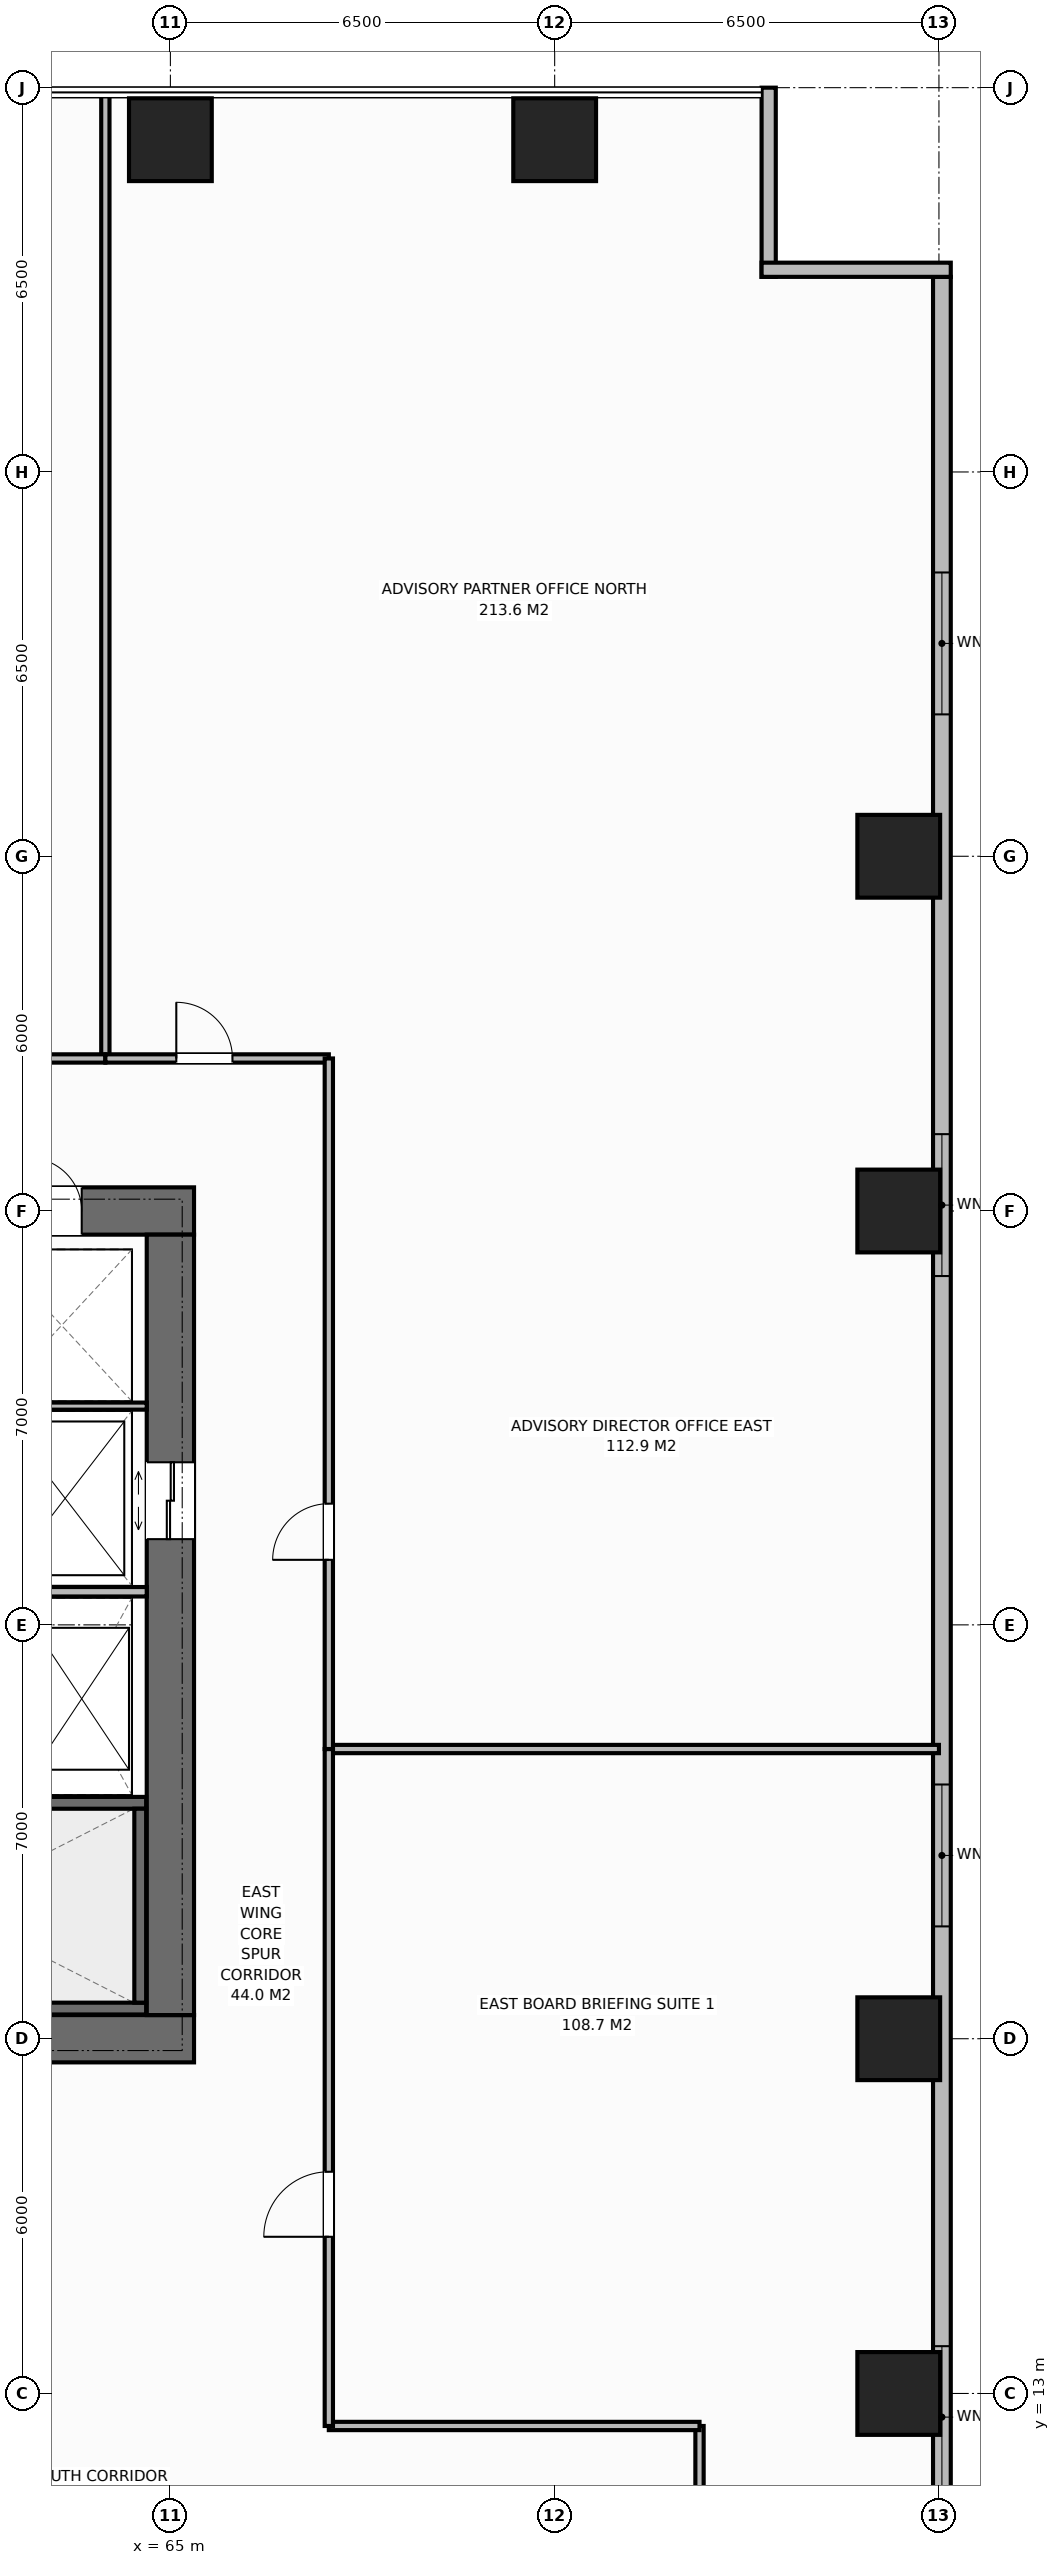
"""IFC4 building model, lengths in metres.
Left out: names, types, materials, properties, quantities, classifications, styles, units other than length and angle.
Written with IfcOpenShell. Run it as: python <this file> out.ifc"""

import sys

from ifc_helpers import new_model, si_unit, direction, frame, frame_2d, origin, origin_2d, place, context, subcontext, project, spatial, rectangle, extrude, element, fill, save


model = new_model("IFC4")
c1 = context("Model", 3, precision=1e-05, world=origin(), true_north=direction((0.0, 1.0)))
c2 = subcontext(c1, "Body", "Model", "MODEL_VIEW")
j1 = project(units=[si_unit("LENGTHUNIT", "METRE"), si_unit("PLANEANGLEUNIT", "RADIAN")], contexts=[c1])
p1 = place(None, origin())
s1 = spatial("IfcSite", under=j1, at=p1, CompositionType="ELEMENT")
p2 = place(p1, origin())
s2 = spatial("IfcBuilding", under=s1, at=p2, CompositionType="ELEMENT")
p3 = place(p2, frame((0.0, 0.0, 6.0)))
s3 = spatial("IfcBuildingStorey", under=s2, at=p3, CompositionType="ELEMENT", Elevation=6.0)
p4 = place(p3, frame((51.6, 19.0, 0.0), z_axis=(0.0, 0.0, 1.0), x_axis=(1.0, 0.0, 0.0)))
e1 = element("IfcWall", 1, at=p4, inside=s3, PredefinedType="SHEAR", context=c2, shape_type="SweptSolid", body=[
    extrude(rectangle(XDim=13.8, YDim=0.8, at=frame_2d((6.9, 0.0))), origin(), (0.0, 0.0, 1.0), 5.5),
])
p5 = place(p4, frame((3.12, 0.0, 0.0)))
e2 = element("IfcOpeningElement", 2, at=p5, cuts=e1, PredefinedType="OPENING", context=c2, shape_type="SweptSolid", body=[
    extrude(rectangle(XDim=1.4, YDim=2.2, at=frame_2d((0.7, 1.1))), frame((0.0, 0.41, 0.0), z_axis=(0.0, -1.0, 0.0), x_axis=(1.0, 0.0, 0.0)), (0.0, 0.0, 1.0), 0.82),
])
p6 = place(p3, frame((51.6, 33.0, 0.0), z_axis=(0.0, 0.0, 1.0), x_axis=(1.0, 0.0, 0.0)))
e3 = element("IfcWall", 3, at=p6, inside=s3, PredefinedType="SHEAR", context=c2, shape_type="SweptSolid", body=[
    extrude(rectangle(XDim=13.8, YDim=0.8, at=frame_2d((6.9, 0.0))), origin(), (0.0, 0.0, 1.0), 5.5),
])
p7 = place(p6, frame((3.12, 0.0, 0.0)))
e4 = element("IfcOpeningElement", 4, at=p7, cuts=e3, PredefinedType="OPENING", context=c2, shape_type="SweptSolid", body=[
    extrude(rectangle(XDim=1.4, YDim=2.2, at=frame_2d((0.7, 1.1))), frame((0.0, 0.41, 0.0), z_axis=(0.0, -1.0, 0.0), x_axis=(1.0, 0.0, 0.0)), (0.0, 0.0, 1.0), 0.82),
])
p8 = place(p6, frame((11.0, 0.0, 0.0)))
e5 = element("IfcOpeningElement", 5, at=p8, cuts=e3, PredefinedType="OPENING", context=c2, shape_type="SweptSolid", body=[
    extrude(rectangle(XDim=0.9, YDim=2.15, at=frame_2d((0.45, 1.075))), frame((0.0, 0.41, 0.0), z_axis=(0.0, -1.0, 0.0), x_axis=(1.0, 0.0, 0.0)), (0.0, 0.0, 1.0), 0.82),
])
p9 = place(p6, frame((5.95, 0.0, 0.0)))
e6 = element("IfcOpeningElement", 6, at=p9, cuts=e3, PredefinedType="OPENING", context=c2, shape_type="SweptSolid", body=[
    extrude(rectangle(XDim=0.9, YDim=2.15, at=frame_2d((0.45, 1.075))), frame((0.0, 0.41, 0.0), z_axis=(0.0, -1.0, 0.0), x_axis=(1.0, 0.0, 0.0)), (0.0, 0.0, 1.0), 0.82),
])
p10 = place(p6, frame((8.35, 0.0, 0.0)))
e7 = element("IfcOpeningElement", 7, at=p10, cuts=e3, PredefinedType="OPENING", context=c2, shape_type="SweptSolid", body=[
    extrude(rectangle(XDim=0.95, YDim=2.15, at=frame_2d((0.475, 1.075))), frame((0.0, 0.41, 0.0), z_axis=(0.0, -1.0, 0.0), x_axis=(1.0, 0.0, 0.0)), (0.0, 0.0, 1.0), 0.82),
])
p11 = place(p3, frame((65.0, 19.4, 0.0), z_axis=(0.0, 0.0, 1.0), x_axis=(0.0, 1.0, 0.0)))
e8 = element("IfcWall", 8, at=p11, inside=s3, PredefinedType="SHEAR", context=c2, shape_type="SweptSolid", body=[
    extrude(rectangle(XDim=13.2, YDim=0.8, at=frame_2d((6.6, 0.0))), origin(), (0.0, 0.0, 1.0), 5.5),
])
p12 = place(p11, frame((8.05, 0.0, 0.0)))
e9 = element("IfcOpeningElement", 9, at=p12, cuts=e8, PredefinedType="OPENING", context=c2, shape_type="SweptSolid", body=[
    extrude(rectangle(XDim=1.3, YDim=2.2, at=frame_2d((0.65, 1.1))), frame((0.0, 0.41, 0.0), z_axis=(0.0, -1.0, 0.0), x_axis=(1.0, 0.0, 0.0)), (0.0, 0.0, 1.0), 0.82),
])
p13 = place(p3, frame((56.16, 19.51, 0.0), z_axis=(0.0, 0.0, 1.0), x_axis=(1.0, 0.0, 0.0)))
e10 = element("IfcWall", 10, at=p13, inside=s3, PredefinedType="SHEAR", context=c2, shape_type="SweptSolid", body=[
    extrude(rectangle(XDim=8.43, YDim=0.2, at=frame_2d((4.215, 0.0))), origin(), (0.0, 0.0, 1.0), 5.5),
])
p14 = place(p3, frame((56.16, 22.99, 0.0), z_axis=(0.0, 0.0, 1.0), x_axis=(1.0, 0.0, 0.0)))
e11 = element("IfcWall", 11, at=p14, inside=s3, PredefinedType="SHEAR", context=c2, shape_type="SweptSolid", body=[
    extrude(rectangle(XDim=8.43, YDim=0.2, at=frame_2d((4.215, 0.0))), origin(), (0.0, 0.0, 1.0), 5.5),
])
p15 = place(p14, frame((0.45, 0.0, 0.0)))
e12 = element("IfcOpeningElement", 12, at=p15, cuts=e11, PredefinedType="OPENING", context=c2, shape_type="SweptSolid", body=[
    extrude(rectangle(XDim=1.0, YDim=2.15, at=frame_2d((0.5, 1.075))), frame((0.0, 0.11, 0.0), z_axis=(0.0, -1.0, 0.0), x_axis=(1.0, 0.0, 0.0)), (0.0, 0.0, 1.0), 0.22),
])
p16 = place(p3, frame((64.49, 19.61, 0.0), z_axis=(0.0, 0.0, 1.0), x_axis=(0.0, 1.0, 0.0)))
e13 = element("IfcWall", 13, at=p16, inside=s3, PredefinedType="SHEAR", context=c2, shape_type="SweptSolid", body=[
    extrude(rectangle(XDim=3.28, YDim=0.2, at=frame_2d((1.64, 0.0))), origin(), (0.0, 0.0, 1.0), 5.5),
])
for number, where, z_axis, x_axis in (
    (14, (65.0, 51.12, 0.0), (0.0, 0.0, 1.0), (1.0, 0.0, 0.0)),
    (15, (71.5, 51.12, 0.0), (0.0, 0.0, 1.0), (1.0, 0.0, 0.0)),
    (16, (77.32, 13.0, 0.0), (0.0, 0.0, 1.0), (1.0, 0.0, 0.0)),
    (17, (77.32, 19.0, 0.0), (0.0, 0.0, 1.0), (1.0, 0.0, 0.0)),
    (18, (77.32, 33.0, 0.0), (0.0, 0.0, 1.0), (1.0, 0.0, 0.0)),
    (19, (77.32, 39.0, 0.0), (0.0, 0.0, 1.0), (1.0, 0.0, 0.0)),
):
    element("IfcColumn", number, at=place(p3, frame(where, z_axis=z_axis, x_axis=x_axis)), inside=s3, PredefinedType="COLUMN", context=c2, shape_type="SweptSolid", body=[
        extrude(rectangle(XDim=1.4, YDim=1.4, at=origin_2d()), origin(), (0.0, 0.0, 1.0), 5.5),
    ])
p17 = place(p3, frame((78.05, 48.8, 0.0), z_axis=(0.0, 0.0, 1.0), x_axis=(0.0, -1.0, 0.0)))
e20 = element("IfcWall", 20, at=p17, inside=s3, PredefinedType="STANDARD", context=c2, shape_type="SweptSolid", body=[
    extrude(rectangle(XDim=45.6, YDim=0.3, at=frame_2d((22.8, 0.0))), origin(), (0.0, 0.0, 1.0), 5.22),
])
p18 = place(p17, frame((5.0, 0.0, 0.9)))
e21 = element("IfcOpeningElement", 21, at=p18, cuts=e20, PredefinedType="OPENING", context=c2, shape_type="SweptSolid", body=[
    extrude(rectangle(XDim=2.4, YDim=2.2, at=frame_2d((1.2, 1.1))), frame((0.0, 0.16, 0.0), z_axis=(0.0, -1.0, 0.0), x_axis=(1.0, 0.0, 0.0)), (0.0, 0.0, 1.0), 0.32),
])
p19 = place(p17, frame((14.5, 0.0, 0.9)))
e22 = element("IfcOpeningElement", 22, at=p19, cuts=e20, PredefinedType="OPENING", context=c2, shape_type="SweptSolid", body=[
    extrude(rectangle(XDim=2.4, YDim=2.2, at=frame_2d((1.2, 1.1))), frame((0.0, 0.16, 0.0), z_axis=(0.0, -1.0, 0.0), x_axis=(1.0, 0.0, 0.0)), (0.0, 0.0, 1.0), 0.32),
])
p20 = place(p17, frame((25.5, 0.0, 0.9)))
e23 = element("IfcOpeningElement", 23, at=p20, cuts=e20, PredefinedType="OPENING", context=c2, shape_type="SweptSolid", body=[
    extrude(rectangle(XDim=2.4, YDim=2.2, at=frame_2d((1.2, 1.1))), frame((0.0, 0.16, 0.0), z_axis=(0.0, -1.0, 0.0), x_axis=(1.0, 0.0, 0.0)), (0.0, 0.0, 1.0), 0.32),
])
p21 = place(p17, frame((35.0, 0.0, 0.9)))
e24 = element("IfcOpeningElement", 24, at=p21, cuts=e20, PredefinedType="OPENING", context=c2, shape_type="SweptSolid", body=[
    extrude(rectangle(XDim=2.4, YDim=2.2, at=frame_2d((1.2, 1.1))), frame((0.0, 0.16, 0.0), z_axis=(0.0, -1.0, 0.0), x_axis=(1.0, 0.0, 0.0)), (0.0, 0.0, 1.0), 0.32),
])
for number, where, z_axis, x_axis in (
    (25, (75.12, 52.0, 0.0), (0.0, 0.0, 1.0), (0.0, -1.0, 0.0)),
    (26, (75.0, 48.92, 0.0), (0.0, 0.0, 1.0), (1.0, 0.0, 0.0)),
):
    element("IfcWall", number, at=place(p3, frame(where, z_axis=z_axis, x_axis=x_axis)), inside=s3, PredefinedType="STANDARD", context=c2, shape_type="SweptSolid", body=[
        extrude(rectangle(XDim=3.2, YDim=0.24, at=frame_2d((1.6, 0.0))), origin(), (0.0, 0.0, 1.0), 5.22),
    ])
p22 = place(p3, frame((56.26, 26.56, 0.0), z_axis=(0.0, 0.0, 1.0), x_axis=(1.0, 0.0, 0.0)))
e27 = element("IfcWall", 27, at=p22, inside=s3, PredefinedType="STANDARD", context=c2, shape_type="SweptSolid", body=[
    extrude(rectangle(XDim=8.34, YDim=0.16, at=frame_2d((4.17, 0.0))), origin(), (0.0, 0.0, 1.0), 5.22),
])
p23 = place(p3, frame((61.87, 29.7, 0.0), z_axis=(0.0, 0.0, 1.0), x_axis=(1.0, 0.0, 0.0)))
e28 = element("IfcWall", 28, at=p23, inside=s3, PredefinedType="PARTITIONING", context=c2, shape_type="SweptSolid", body=[
    extrude(rectangle(XDim=2.73, YDim=0.12, at=frame_2d((1.365, 0.0))), origin(), (0.0, 0.0, 1.0), 5.22),
])
p24 = place(p3, frame((63.9, 35.58, 0.0), z_axis=(0.0, 0.0, 1.0), x_axis=(0.0, 1.0, 0.0)))
e29 = element("IfcWall", 29, at=p24, inside=s3, PredefinedType="PARTITIONING", context=c2, shape_type="SweptSolid", body=[
    extrude(rectangle(XDim=16.36, YDim=0.14, at=frame_2d((8.18, 0.0))), origin(), (0.0, 0.0, 1.0), 5.22),
])
p25 = place(p3, frame((67.68, 23.9, 0.0), z_axis=(0.0, 0.0, 1.0), x_axis=(1.0, 0.0, 0.0)))
e30 = element("IfcWall", 30, at=p25, inside=s3, PredefinedType="PARTITIONING", context=c2, shape_type="SweptSolid", body=[
    extrude(rectangle(XDim=10.32, YDim=0.14, at=frame_2d((5.16, 0.0))), origin(), (0.0, 0.0, 1.0), 5.22),
])
p26 = place(p3, frame((73.95, 10.19, 0.0), z_axis=(0.0, 0.0, 1.0), x_axis=(0.0, 1.0, 0.0)))
e31 = element("IfcWall", 31, at=p26, inside=s3, PredefinedType="PARTITIONING", context=c2, shape_type="SweptSolid", body=[
    extrude(rectangle(XDim=2.26, YDim=0.14, at=frame_2d((1.13, 0.0))), origin(), (0.0, 0.0, 1.0), 5.22),
])
p27 = place(p3, frame((67.68, 12.45, 0.0), z_axis=(0.0, 0.0, 1.0), x_axis=(1.0, 0.0, 0.0)))
e32 = element("IfcWall", 32, at=p27, inside=s3, PredefinedType="PARTITIONING", context=c2, shape_type="SweptSolid", body=[
    extrude(rectangle(XDim=6.27, YDim=0.14, at=frame_2d((3.135, 0.0))), origin(), (0.0, 0.0, 1.0), 5.22),
])
p28 = place(p3, frame((52.08, 35.58, 0.0), z_axis=(0.0, 0.0, 1.0), x_axis=(1.0, 0.0, 0.0)))
e33 = element("IfcWall", 33, at=p28, inside=s3, PredefinedType="PARTITIONING", context=c2, shape_type="SweptSolid", body=[
    extrude(rectangle(XDim=11.82, YDim=0.14, at=frame_2d((5.91, 0.0))), origin(), (0.0, 0.0, 1.0), 5.22),
])
p29 = place(p28, frame((3.0, 0.0, 0.0)))
e34 = element("IfcOpeningElement", 34, at=p29, cuts=e33, PredefinedType="OPENING", context=c2, shape_type="SweptSolid", body=[
    extrude(rectangle(XDim=1.1, YDim=2.15, at=frame_2d((0.55, 1.075))), frame((0.0, 0.08, 0.0), z_axis=(0.0, -1.0, 0.0), x_axis=(1.0, 0.0, 0.0)), (0.0, 0.0, 1.0), 0.16),
])
p30 = place(p3, frame((63.9, 35.58, 0.0), z_axis=(0.0, 0.0, 1.0), x_axis=(1.0, 0.0, 0.0)))
e35 = element("IfcWall", 35, at=p30, inside=s3, PredefinedType="PARTITIONING", context=c2, shape_type="SweptSolid", body=[
    extrude(rectangle(XDim=3.78, YDim=0.14, at=frame_2d((1.89, 0.0))), origin(), (0.0, 0.0, 1.0), 5.22),
])
p31 = place(p30, frame((1.2, 0.0, 0.0)))
e36 = element("IfcOpeningElement", 36, at=p31, cuts=e35, PredefinedType="OPENING", context=c2, shape_type="SweptSolid", body=[
    extrude(rectangle(XDim=0.95, YDim=2.15, at=frame_2d((0.475, 1.075))), frame((0.0, 0.08, 0.0), z_axis=(0.0, -1.0, 0.0), x_axis=(1.0, 0.0, 0.0)), (0.0, 0.0, 1.0), 0.16),
])
p32 = place(p3, frame((67.68, 12.45, 0.0), z_axis=(0.0, 0.0, 1.0), x_axis=(0.0, 1.0, 0.0)))
e37 = element("IfcWall", 37, at=p32, inside=s3, PredefinedType="PARTITIONING", context=c2, shape_type="SweptSolid", body=[
    extrude(rectangle(XDim=11.45, YDim=0.14, at=frame_2d((5.725, 0.0))), origin(), (0.0, 0.0, 1.0), 5.22),
])
p33 = place(p32, frame((3.2, 0.0, 0.0)))
e38 = element("IfcOpeningElement", 38, at=p33, cuts=e37, PredefinedType="OPENING", context=c2, shape_type="SweptSolid", body=[
    extrude(rectangle(XDim=1.1, YDim=2.15, at=frame_2d((0.55, 1.075))), frame((0.0, 0.08, 0.0), z_axis=(0.0, -1.0, 0.0), x_axis=(1.0, 0.0, 0.0)), (0.0, 0.0, 1.0), 0.16),
])
p34 = place(p3, frame((67.68, 23.9, 0.0), z_axis=(0.0, 0.0, 1.0), x_axis=(0.0, 1.0, 0.0)))
e39 = element("IfcWall", 39, at=p34, inside=s3, PredefinedType="PARTITIONING", context=c2, shape_type="SweptSolid", body=[
    extrude(rectangle(XDim=11.68, YDim=0.14, at=frame_2d((5.84, 0.0))), origin(), (0.0, 0.0, 1.0), 5.22),
])
p35 = place(p34, frame((3.2, 0.0, 0.0)))
e40 = element("IfcOpeningElement", 40, at=p35, cuts=e39, PredefinedType="OPENING", context=c2, shape_type="SweptSolid", body=[
    extrude(rectangle(XDim=0.95, YDim=2.15, at=frame_2d((0.475, 1.075))), frame((0.0, 0.08, 0.0), z_axis=(0.0, -1.0, 0.0), x_axis=(1.0, 0.0, 0.0)), (0.0, 0.0, 1.0), 0.16),
])
p36 = place(p18, origin())
e41 = element("IfcWindow", 41, at=p36, inside=s3, PartitioningType="SINGLE_PANEL", PredefinedType="WINDOW", context=c2, shape_type="SweptSolid", body=[
    extrude(rectangle(XDim=2.4, YDim=2.2, at=frame_2d((1.2, 1.1))), frame((0.0, 0.03, 0.0), z_axis=(0.0, -1.0, 0.0), x_axis=(1.0, 0.0, 0.0)), (0.0, 0.0, 1.0), 0.06),
])
fill(e21, e41)
p37 = place(p19, origin())
e42 = element("IfcWindow", 42, at=p37, inside=s3, PartitioningType="SINGLE_PANEL", PredefinedType="WINDOW", context=c2, shape_type="SweptSolid", body=[
    extrude(rectangle(XDim=2.4, YDim=2.2, at=frame_2d((1.2, 1.1))), frame((0.0, 0.03, 0.0), z_axis=(0.0, -1.0, 0.0), x_axis=(1.0, 0.0, 0.0)), (0.0, 0.0, 1.0), 0.06),
])
fill(e22, e42)
p38 = place(p20, origin())
e43 = element("IfcWindow", 43, at=p38, inside=s3, PartitioningType="SINGLE_PANEL", PredefinedType="WINDOW", context=c2, shape_type="SweptSolid", body=[
    extrude(rectangle(XDim=2.4, YDim=2.2, at=frame_2d((1.2, 1.1))), frame((0.0, 0.03, 0.0), z_axis=(0.0, -1.0, 0.0), x_axis=(1.0, 0.0, 0.0)), (0.0, 0.0, 1.0), 0.06),
])
fill(e23, e43)
p39 = place(p21, origin())
e44 = element("IfcWindow", 44, at=p39, inside=s3, PartitioningType="SINGLE_PANEL", PredefinedType="WINDOW", context=c2, shape_type="SweptSolid", body=[
    extrude(rectangle(XDim=2.4, YDim=2.2, at=frame_2d((1.2, 1.1))), frame((0.0, 0.03, 0.0), z_axis=(0.0, -1.0, 0.0), x_axis=(1.0, 0.0, 0.0)), (0.0, 0.0, 1.0), 0.06),
])
fill(e24, e44)
p40 = place(p12, origin())
e45 = element("IfcDoor", 45, at=p40, inside=s3, OperationType="DOUBLE_DOOR_SLIDING", PredefinedType="DOOR", context=c2, shape_type="SweptSolid", body=[
    extrude(rectangle(XDim=1.3, YDim=2.2, at=frame_2d((0.65, 1.1))), frame((0.0, 0.025, 0.0), z_axis=(0.0, -1.0, 0.0), x_axis=(1.0, 0.0, 0.0)), (0.0, 0.0, 1.0), 0.05),
])
fill(e9, e45)
p41 = place(p8, origin())
e46 = element("IfcDoor", 46, at=p41, inside=s3, OperationType="SINGLE_SWING_LEFT", PredefinedType="DOOR", context=c2, shape_type="SweptSolid", body=[
    extrude(rectangle(XDim=0.9, YDim=2.15, at=frame_2d((0.45, 1.075))), frame((0.0, -0.075, 0.0), z_axis=(0.0, -1.0, 0.0), x_axis=(1.0, 0.0, 0.0)), (0.0, 0.0, 1.0), 0.05),
])
fill(e5, e46)
p42 = place(p31, origin())
e47 = element("IfcDoor", 47, at=p42, inside=s3, OperationType="SINGLE_SWING_LEFT", PredefinedType="DOOR", context=c2, shape_type="SweptSolid", body=[
    extrude(rectangle(XDim=0.95, YDim=2.15, at=frame_2d((0.475, 1.075))), frame((0.0, 0.025, 0.0), z_axis=(0.0, -1.0, 0.0), x_axis=(1.0, 0.0, 0.0)), (0.0, 0.0, 1.0), 0.05),
])
fill(e36, e47)
p43 = place(p33, origin())
e48 = element("IfcDoor", 48, at=p43, inside=s3, OperationType="SINGLE_SWING_LEFT", PredefinedType="DOOR", context=c2, shape_type="SweptSolid", body=[
    extrude(rectangle(XDim=1.1, YDim=2.15, at=frame_2d((0.55, 1.075))), frame((0.0, 0.025, 0.0), z_axis=(0.0, -1.0, 0.0), x_axis=(1.0, 0.0, 0.0)), (0.0, 0.0, 1.0), 0.05),
])
fill(e38, e48)
p44 = place(p35, origin())
e49 = element("IfcDoor", 49, at=p44, inside=s3, OperationType="SINGLE_SWING_LEFT", PredefinedType="DOOR", context=c2, shape_type="SweptSolid", body=[
    extrude(rectangle(XDim=0.95, YDim=2.15, at=frame_2d((0.475, 1.075))), frame((0.0, 0.025, 0.0), z_axis=(0.0, -1.0, 0.0), x_axis=(1.0, 0.0, 0.0)), (0.0, 0.0, 1.0), 0.05),
])
fill(e40, e49)
save(model, sys.argv[1])
